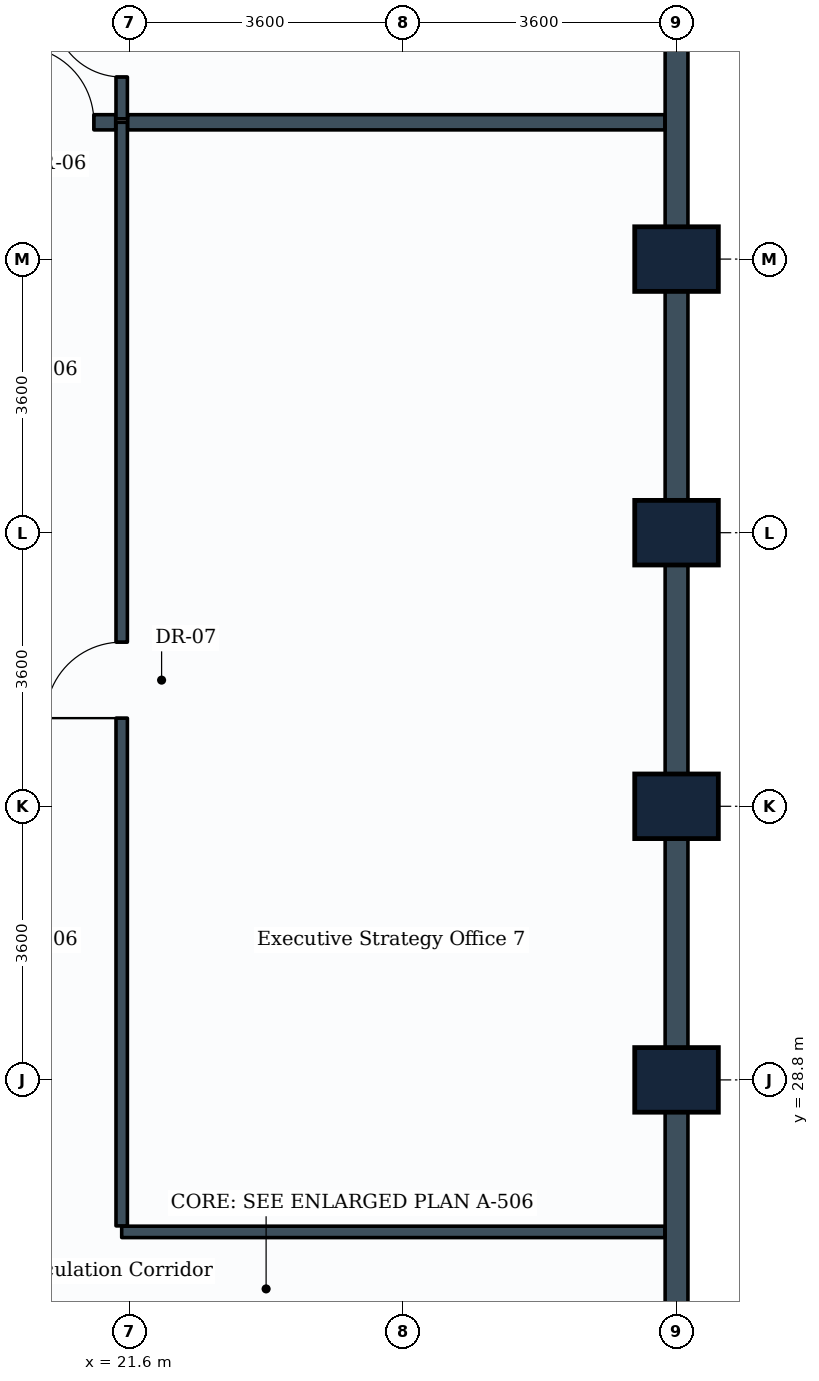
"""IFC4 building model, lengths in metres.
Left out: names, types, materials, properties, quantities, classifications, styles, units other than length and angle.
Written with IfcOpenShell. Run it as: python <this file> out.ifc"""

import sys

from ifc_helpers import new_model, si_unit, direction, frame, frame_2d, origin, origin_2d, place, context, subcontext, project, spatial, rectangle, extrude, element, fill, save


model = new_model("IFC4")
c1 = context("Model", 3, precision=1e-05, world=origin(), true_north=direction((0.0, 1.0)))
c2 = subcontext(c1, "Body", "Model", "MODEL_VIEW")
j1 = project(units=[si_unit("LENGTHUNIT", "METRE"), si_unit("PLANEANGLEUNIT", "RADIAN")], contexts=[c1])
p1 = place(None, origin())
s1 = spatial("IfcSite", under=j1, at=p1, CompositionType="ELEMENT")
p2 = place(p1, origin())
s2 = spatial("IfcBuilding", under=s1, at=p2, CompositionType="ELEMENT")
p3 = place(p2, frame((0.0, 0.0, 123.8)))
s3 = spatial("IfcBuildingStorey", under=s2, at=p3, CompositionType="ELEMENT", Elevation=123.8)
for number, where, z_axis, x_axis in (
    (1, (28.8, 28.8, 0.0), (0.0, 0.0, 1.0), (0.0, 1.0, 0.0)),
    (2, (28.8, 32.4, 0.0), (0.0, 0.0, 1.0), (0.0, 1.0, 0.0)),
    (3, (28.8, 36.0, 0.0), (0.0, 0.0, 1.0), (0.0, 1.0, 0.0)),
    (4, (28.8, 39.6, 0.0), (0.0, 0.0, 1.0), (0.0, 1.0, 0.0)),
):
    element("IfcColumn", number, at=place(p3, frame(where, z_axis=z_axis, x_axis=x_axis)), inside=s3, PredefinedType="COLUMN", context=c2, shape_type="SweptSolid", body=[
        extrude(rectangle(XDim=0.85, YDim=1.1, at=origin_2d()), origin(), (0.0, 0.0, 1.0), 3.8),
    ])
p4 = place(p3, frame((28.8, 28.8, 0.0), z_axis=(0.0, 0.0, 1.0), x_axis=(0.0, -1.0, 0.0)))
e5 = element("IfcWall", 5, at=p4, inside=s3, PredefinedType="STANDARD", context=c2, shape_type="SweptSolid", body=[
    extrude(rectangle(XDim=3.6, YDim=0.3, at=frame_2d((1.8, 0.0))), origin(), (0.0, 0.0, 1.0), 3.15),
])
p5 = place(p3, frame((28.8, 32.4, 0.0), z_axis=(0.0, 0.0, 1.0), x_axis=(0.0, -1.0, 0.0)))
e6 = element("IfcWall", 6, at=p5, inside=s3, PredefinedType="STANDARD", context=c2, shape_type="SweptSolid", body=[
    extrude(rectangle(XDim=3.6, YDim=0.3, at=frame_2d((1.8, 0.0))), origin(), (0.0, 0.0, 1.0), 2.93),
])
for number, where, z_axis, x_axis in (
    (7, (28.8, 36.0, 0.0), (0.0, 0.0, 1.0), (0.0, -1.0, 0.0)),
    (8, (28.8, 39.6, 0.0), (0.0, 0.0, 1.0), (0.0, -1.0, 0.0)),
):
    element("IfcWall", number, at=place(p3, frame(where, z_axis=z_axis, x_axis=x_axis)), inside=s3, PredefinedType="STANDARD", context=c2, shape_type="SweptSolid", body=[
        extrude(rectangle(XDim=3.6, YDim=0.3, at=frame_2d((1.8, 0.0))), origin(), (0.0, 0.0, 1.0), 2.93),
    ])
p6 = place(p3, frame((28.8, 43.2, 0.0), z_axis=(0.0, 0.0, 1.0), x_axis=(0.0, -1.0, 0.0)))
e9 = element("IfcWall", 9, at=p6, inside=s3, PredefinedType="STANDARD", context=c2, shape_type="SweptSolid", body=[
    extrude(rectangle(XDim=3.6, YDim=0.3, at=frame_2d((1.8, 0.0))), origin(), (0.0, 0.0, 1.0), 2.43),
])
p7 = place(p3, frame((21.5, 26.8, 0.0), z_axis=(0.0, 0.0, 1.0), x_axis=(1.0, 0.0, 0.0)))
e10 = element("IfcWall", 10, at=p7, inside=s3, PredefinedType="PARTITIONING", context=c2, shape_type="SweptSolid", body=[
    extrude(rectangle(XDim=7.146, YDim=0.15, at=frame_2d((3.573, 0.0))), origin(), (0.0, 0.0, 1.0), 3.465),
])
p8 = place(p3, frame((21.5, 26.879, 0.0), z_axis=(0.0, 0.0, 1.0), x_axis=(0.0, 1.0, 0.0)))
e11 = element("IfcWall", 11, at=p8, inside=s3, PredefinedType="PARTITIONING", context=c2, shape_type="SweptSolid", body=[
    extrude(rectangle(XDim=14.521, YDim=0.15, at=frame_2d((7.26, 0.0))), origin(), (0.0, 0.0, 1.0), 3.06),
])
p9 = place(p8, frame((6.681, 0.0, 0.0)))
e12 = element("IfcOpeningElement", 12, at=p9, cuts=e11, PredefinedType="OPENING", context=c2, shape_type="SweptSolid", body=[
    extrude(rectangle(XDim=1.0, YDim=2.1, at=frame_2d((0.5, 1.05))), frame((0.0, 0.085, 0.0), z_axis=(0.0, -1.0, 0.0), x_axis=(1.0, 0.0, 0.0)), (0.0, 0.0, 1.0), 0.17),
])
p10 = place(p3, frame((21.579, 41.4, 0.0), z_axis=(0.0, 0.0, 1.0), x_axis=(1.0, 0.0, 0.0)))
e13 = element("IfcWall", 13, at=p10, inside=s3, PredefinedType="PARTITIONING", context=c2, shape_type="SweptSolid", body=[
    extrude(rectangle(XDim=7.067, YDim=0.2, at=frame_2d((3.533, 0.0))), origin(), (0.0, 0.0, 1.0), 3.465),
])
p11 = place(p3, frame((19.754, 41.4, 0.0), z_axis=(0.0, 0.0, 1.0), x_axis=(1.0, 0.0, 0.0)))
e14 = element("IfcWall", 14, at=p11, inside=s3, PredefinedType="PARTITIONING", context=c2, shape_type="SweptSolid", body=[
    extrude(rectangle(XDim=1.667, YDim=0.2, at=frame_2d((0.833, 0.0))), origin(), (0.0, 0.0, 1.0), 3.465),
])
p12 = place(p11, frame((0.38, 0.0, 0.0)))
e15 = element("IfcOpeningElement", 15, at=p12, cuts=e14, PredefinedType="OPENING", context=c2, shape_type="SweptSolid", body=[
    extrude(rectangle(XDim=1.0, YDim=2.1, at=frame_2d((0.5, 1.05))), frame((0.0, 0.11, 0.0), z_axis=(0.0, -1.0, 0.0), x_axis=(1.0, 0.0, 0.0)), (0.0, 0.0, 1.0), 0.22),
])
p13 = place(p3, frame((21.5, 41.446, 0.0), z_axis=(0.0, 0.0, 1.0), x_axis=(0.0, 1.0, 0.0)))
e16 = element("IfcWall", 16, at=p13, inside=s3, PredefinedType="PARTITIONING", context=c2, shape_type="SweptSolid", body=[
    extrude(rectangle(XDim=5.2, YDim=0.15, at=frame_2d((2.6, 0.0))), origin(), (0.0, 0.0, 1.0), 2.43),
])
p14 = place(p13, frame((0.55, 0.0, 0.0)))
e17 = element("IfcOpeningElement", 17, at=p14, cuts=e16, PredefinedType="OPENING", context=c2, shape_type="SweptSolid", body=[
    extrude(rectangle(XDim=0.9, YDim=2.1, at=frame_2d((0.45, 1.05))), frame((0.0, 0.085, 0.0), z_axis=(0.0, -1.0, 0.0), x_axis=(1.0, 0.0, 0.0)), (0.0, 0.0, 1.0), 0.17),
])
p15 = place(p9, origin())
e18 = element("IfcDoor", 18, at=p15, inside=s3, OperationType="SINGLE_SWING_LEFT", PredefinedType="DOOR", context=c2, shape_type="SweptSolid", body=[
    extrude(rectangle(XDim=1.0, YDim=2.1, at=frame_2d((0.5, 1.05))), frame((0.0, 0.025, 0.0), z_axis=(0.0, -1.0, 0.0), x_axis=(1.0, 0.0, 0.0)), (0.0, 0.0, 1.0), 0.05),
])
fill(e12, e18)
p16 = place(p12, origin())
e19 = element("IfcDoor", 19, at=p16, inside=s3, OperationType="SINGLE_SWING_LEFT", PredefinedType="DOOR", context=c2, shape_type="SweptSolid", body=[
    extrude(rectangle(XDim=1.0, YDim=2.1, at=frame_2d((0.5, 1.05))), frame((0.0, 0.025, 0.0), z_axis=(0.0, -1.0, 0.0), x_axis=(1.0, 0.0, 0.0)), (0.0, 0.0, 1.0), 0.05),
])
fill(e15, e19)
p17 = place(p14, origin())
e20 = element("IfcDoor", 20, at=p17, inside=s3, OperationType="SINGLE_SWING_RIGHT", PredefinedType="DOOR", context=c2, shape_type="SweptSolid", body=[
    extrude(rectangle(XDim=0.9, YDim=2.1, at=frame_2d((0.45, 1.05))), frame((0.0, 0.025, 0.0), z_axis=(0.0, -1.0, 0.0), x_axis=(1.0, 0.0, 0.0)), (0.0, 0.0, 1.0), 0.05),
])
fill(e17, e20)
save(model, sys.argv[1])
